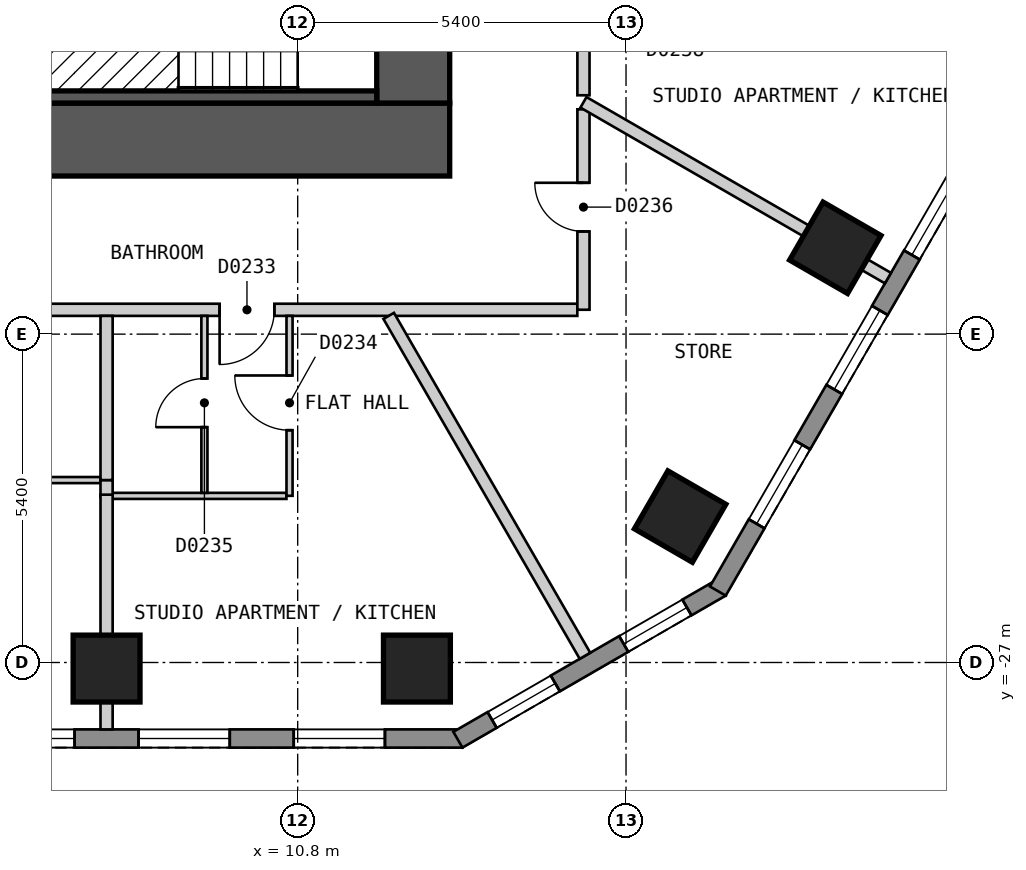
"""IFC4 building model, lengths in metres.
Left out: names, types, materials, properties, quantities, classifications, styles, units other than length and angle.
Written with IfcOpenShell. Run it as: python <this file> out.ifc"""

import sys

from ifc_helpers import new_model, si_unit, direction, frame, frame_2d, origin, origin_2d, place, context, subcontext, project, spatial, polyline, rectangle, outline, extrude, element, fill, save


model = new_model("IFC4")
c1 = context("Model", 3, precision=1e-05, world=origin(), true_north=direction((0.0, 1.0)))
c2 = subcontext(c1, "Body", "Model", "MODEL_VIEW")
j1 = project(units=[si_unit("LENGTHUNIT", "METRE"), si_unit("PLANEANGLEUNIT", "RADIAN")], contexts=[c1])
p1 = place(None, origin())
s1 = spatial("IfcSite", under=j1, at=p1, CompositionType="ELEMENT")
p2 = place(p1, origin())
s2 = spatial("IfcBuilding", under=s1, at=p2, CompositionType="ELEMENT")
p3 = place(p2, frame((0.0, 0.0, 41.4)))
s3 = spatial("IfcBuildingStorey", under=s2, at=p3, CompositionType="ELEMENT", Elevation=41.4)
for number, where, z_axis, x_axis in (
    (1, (7.657, -27.1, 0.0), (0.0, 0.0, 1.0), (1.0, 0.0, 0.0)),
    (2, (12.761, -27.1, 0.0), (0.0, 0.0, 1.0), (1.0, 0.0, 0.0)),
    (3, (17.09, -24.6, 0.0), (0.0, 0.0, 1.0), (0.5, 0.866, 0.0)),
    (4, (19.642, -20.18, 0.0), (0.0, 0.0, 1.0), (0.5, 0.866, 0.0)),
):
    element("IfcColumn", number, at=place(p3, frame(where, z_axis=z_axis, x_axis=x_axis)), inside=s3, PredefinedType="COLUMN", context=c2, shape_type="SweptSolid", body=[
        extrude(rectangle(XDim=1.1, YDim=1.1, at=origin_2d()), origin(), (0.0, 0.0, 1.0), 3.0),
    ])
p4 = place(p3, frame((-13.3, -18.4, 0.0), z_axis=(0.0, 0.0, 1.0), x_axis=(1.0, 0.0, 0.0)))
e5 = element("IfcWall", 5, at=p4, inside=s3, PredefinedType="SHEAR", context=c2, shape_type="SweptSolid", body=[
    extrude(rectangle(XDim=26.6, YDim=1.2, at=frame_2d((13.3, 0.0))), origin(), (0.0, 0.0, 1.0), 2.7),
])
p5 = place(p3, frame((12.7, -17.8, 0.0), z_axis=(0.0, 0.0, 1.0), x_axis=(0.0, 1.0, 0.0)))
e6 = element("IfcWall", 6, at=p5, inside=s3, PredefinedType="SHEAR", context=c2, shape_type="SweptSolid", body=[
    extrude(rectangle(XDim=11.6, YDim=1.2, at=frame_2d((5.8, 0.0))), origin(), (0.0, 0.0, 1.0), 2.7),
])
p6 = place(p3, frame((-13.51, -28.25, 0.0), z_axis=(0.0, 0.0, 1.0), x_axis=(1.0, 0.0, 0.0)))
e7 = element("IfcWall", 7, at=p6, inside=s3, PredefinedType="SOLIDWALL", context=c2, shape_type="SweptSolid", body=[
    extrude(outline(polyline([(0.0, -0.15), (27.02, -0.15), (26.94, 0.15), (0.08, 0.15), (0.0, -0.15)])), origin(), (0.0, 0.0, 1.0), 2.7),
])
p7 = place(p6, frame((1.277, 0.0, 0.15)))
e8 = element("IfcOpeningElement", 8, at=p7, cuts=e7, PredefinedType="OPENING", context=c2, shape_type="SweptSolid", body=[
    extrude(rectangle(XDim=1.5, YDim=2.1, at=frame_2d((0.75, 1.05))), frame((0.0, 0.16, 0.0), z_axis=(0.0, -1.0, 0.0), x_axis=(1.0, 0.0, 0.0)), (0.0, 0.0, 1.0), 0.32),
])
p8 = place(p6, frame((3.829, 0.0, 0.15)))
e9 = element("IfcOpeningElement", 9, at=p8, cuts=e7, PredefinedType="OPENING", context=c2, shape_type="SweptSolid", body=[
    extrude(rectangle(XDim=1.5, YDim=2.1, at=frame_2d((0.75, 1.05))), frame((0.0, 0.16, 0.0), z_axis=(0.0, -1.0, 0.0), x_axis=(1.0, 0.0, 0.0)), (0.0, 0.0, 1.0), 0.32),
])
p9 = place(p6, frame((6.381, 0.0, 0.15)))
e10 = element("IfcOpeningElement", 10, at=p9, cuts=e7, PredefinedType="OPENING", context=c2, shape_type="SweptSolid", body=[
    extrude(rectangle(XDim=1.5, YDim=2.1, at=frame_2d((0.75, 1.05))), frame((0.0, 0.16, 0.0), z_axis=(0.0, -1.0, 0.0), x_axis=(1.0, 0.0, 0.0)), (0.0, 0.0, 1.0), 0.32),
])
p10 = place(p6, frame((8.933, 0.0, 0.15)))
e11 = element("IfcOpeningElement", 11, at=p10, cuts=e7, PredefinedType="OPENING", context=c2, shape_type="SweptSolid", body=[
    extrude(rectangle(XDim=1.5, YDim=2.1, at=frame_2d((0.75, 1.05))), frame((0.0, 0.16, 0.0), z_axis=(0.0, -1.0, 0.0), x_axis=(1.0, 0.0, 0.0)), (0.0, 0.0, 1.0), 0.32),
])
p11 = place(p6, frame((11.485, 0.0, 0.15)))
e12 = element("IfcOpeningElement", 12, at=p11, cuts=e7, PredefinedType="OPENING", context=c2, shape_type="SweptSolid", body=[
    extrude(rectangle(XDim=1.5, YDim=2.1, at=frame_2d((0.75, 1.05))), frame((0.0, 0.16, 0.0), z_axis=(0.0, -1.0, 0.0), x_axis=(1.0, 0.0, 0.0)), (0.0, 0.0, 1.0), 0.32),
])
p12 = place(p6, frame((14.037, 0.0, 0.15)))
e13 = element("IfcOpeningElement", 13, at=p12, cuts=e7, PredefinedType="OPENING", context=c2, shape_type="SweptSolid", body=[
    extrude(rectangle(XDim=1.5, YDim=2.1, at=frame_2d((0.75, 1.05))), frame((0.0, 0.16, 0.0), z_axis=(0.0, -1.0, 0.0), x_axis=(1.0, 0.0, 0.0)), (0.0, 0.0, 1.0), 0.32),
])
p13 = place(p6, frame((16.589, 0.0, 0.15)))
e14 = element("IfcOpeningElement", 14, at=p13, cuts=e7, PredefinedType="OPENING", context=c2, shape_type="SweptSolid", body=[
    extrude(rectangle(XDim=1.5, YDim=2.1, at=frame_2d((0.75, 1.05))), frame((0.0, 0.16, 0.0), z_axis=(0.0, -1.0, 0.0), x_axis=(1.0, 0.0, 0.0)), (0.0, 0.0, 1.0), 0.32),
])
p14 = place(p6, frame((19.141, 0.0, 0.15)))
e15 = element("IfcOpeningElement", 15, at=p14, cuts=e7, PredefinedType="OPENING", context=c2, shape_type="SweptSolid", body=[
    extrude(rectangle(XDim=1.5, YDim=2.1, at=frame_2d((0.75, 1.05))), frame((0.0, 0.16, 0.0), z_axis=(0.0, -1.0, 0.0), x_axis=(1.0, 0.0, 0.0)), (0.0, 0.0, 1.0), 0.32),
])
p15 = place(p6, frame((21.693, 0.0, 0.15)))
e16 = element("IfcOpeningElement", 16, at=p15, cuts=e7, PredefinedType="OPENING", context=c2, shape_type="SweptSolid", body=[
    extrude(rectangle(XDim=1.5, YDim=2.1, at=frame_2d((0.75, 1.05))), frame((0.0, 0.16, 0.0), z_axis=(0.0, -1.0, 0.0), x_axis=(1.0, 0.0, 0.0)), (0.0, 0.0, 1.0), 0.32),
])
p16 = place(p6, frame((24.245, 0.0, 0.15)))
e17 = element("IfcOpeningElement", 17, at=p16, cuts=e7, PredefinedType="OPENING", context=c2, shape_type="SweptSolid", body=[
    extrude(rectangle(XDim=1.5, YDim=2.1, at=frame_2d((0.75, 1.05))), frame((0.0, 0.16, 0.0), z_axis=(0.0, -1.0, 0.0), x_axis=(1.0, 0.0, 0.0)), (0.0, 0.0, 1.0), 0.32),
])
p17 = place(p3, frame((13.435, -28.27, 0.0), z_axis=(0.0, 0.0, 1.0), x_axis=(0.866010750942, 0.50002537861, 0.0)))
e18 = element("IfcWall", 18, at=p17, inside=s3, PredefinedType="SOLIDWALL", context=c2, shape_type="SweptSolid", body=[
    extrude(outline(polyline([(0.0, -0.15), (5.0, -0.15), (4.919, 0.15), (0.08, 0.15), (0.0, -0.15)])), origin(), (0.0, 0.0, 1.0), 2.7),
])
p18 = place(p17, frame((0.65, 0.0, 0.15)))
e19 = element("IfcOpeningElement", 19, at=p18, cuts=e18, PredefinedType="OPENING", context=c2, shape_type="SweptSolid", body=[
    extrude(rectangle(XDim=1.2, YDim=2.1, at=frame_2d((0.6, 1.05))), frame((0.0, 0.16, 0.0), z_axis=(0.0, -1.0, 0.0), x_axis=(1.0, 0.0, 0.0)), (0.0, 0.0, 1.0), 0.32),
])
p19 = place(p17, frame((3.149, 0.0, 0.15)))
e20 = element("IfcOpeningElement", 20, at=p19, cuts=e18, PredefinedType="OPENING", context=c2, shape_type="SweptSolid", body=[
    extrude(rectangle(XDim=1.2, YDim=2.1, at=frame_2d((0.6, 1.05))), frame((0.0, 0.16, 0.0), z_axis=(0.0, -1.0, 0.0), x_axis=(1.0, 0.0, 0.0)), (0.0, 0.0, 1.0), 0.32),
])
p20 = place(p3, frame((17.71, -25.825, 0.0), z_axis=(0.0, 0.0, 1.0), x_axis=(0.500001938803, 0.866024284413, 0.0)))
e21 = element("IfcWall", 21, at=p20, inside=s3, PredefinedType="SOLIDWALL", context=c2, shape_type="SweptSolid", body=[
    extrude(outline(polyline([(0.0, -0.15), (27.02, -0.15), (26.94, 0.15), (0.08, 0.15), (0.0, -0.15)])), origin(), (0.0, 0.0, 1.0), 2.7),
])
p21 = place(p20, frame((1.277, 0.0, 0.15)))
e22 = element("IfcOpeningElement", 22, at=p21, cuts=e21, PredefinedType="OPENING", context=c2, shape_type="SweptSolid", body=[
    extrude(rectangle(XDim=1.5, YDim=2.1, at=frame_2d((0.75, 1.05))), frame((0.0, 0.16, 0.0), z_axis=(0.0, -1.0, 0.0), x_axis=(1.0, 0.0, 0.0)), (0.0, 0.0, 1.0), 0.32),
])
p22 = place(p20, frame((3.829, 0.0, 0.15)))
e23 = element("IfcOpeningElement", 23, at=p22, cuts=e21, PredefinedType="OPENING", context=c2, shape_type="SweptSolid", body=[
    extrude(rectangle(XDim=1.5, YDim=2.1, at=frame_2d((0.75, 1.05))), frame((0.0, 0.16, 0.0), z_axis=(0.0, -1.0, 0.0), x_axis=(1.0, 0.0, 0.0)), (0.0, 0.0, 1.0), 0.32),
])
p23 = place(p20, frame((6.382, 0.0, 0.15)))
e24 = element("IfcOpeningElement", 24, at=p23, cuts=e21, PredefinedType="OPENING", context=c2, shape_type="SweptSolid", body=[
    extrude(rectangle(XDim=1.5, YDim=2.1, at=frame_2d((0.75, 1.05))), frame((0.0, 0.16, 0.0), z_axis=(0.0, -1.0, 0.0), x_axis=(1.0, 0.0, 0.0)), (0.0, 0.0, 1.0), 0.32),
])
p24 = place(p20, frame((8.933, 0.0, 0.15)))
e25 = element("IfcOpeningElement", 25, at=p24, cuts=e21, PredefinedType="OPENING", context=c2, shape_type="SweptSolid", body=[
    extrude(rectangle(XDim=1.5, YDim=2.1, at=frame_2d((0.75, 1.05))), frame((0.0, 0.16, 0.0), z_axis=(0.0, -1.0, 0.0), x_axis=(1.0, 0.0, 0.0)), (0.0, 0.0, 1.0), 0.32),
])
p25 = place(p20, frame((11.485, 0.0, 0.15)))
e26 = element("IfcOpeningElement", 26, at=p25, cuts=e21, PredefinedType="OPENING", context=c2, shape_type="SweptSolid", body=[
    extrude(rectangle(XDim=1.5, YDim=2.1, at=frame_2d((0.75, 1.05))), frame((0.0, 0.16, 0.0), z_axis=(0.0, -1.0, 0.0), x_axis=(1.0, 0.0, 0.0)), (0.0, 0.0, 1.0), 0.32),
])
p26 = place(p20, frame((14.037, 0.0, 0.15)))
e27 = element("IfcOpeningElement", 27, at=p26, cuts=e21, PredefinedType="OPENING", context=c2, shape_type="SweptSolid", body=[
    extrude(rectangle(XDim=1.5, YDim=2.1, at=frame_2d((0.75, 1.05))), frame((0.0, 0.16, 0.0), z_axis=(0.0, -1.0, 0.0), x_axis=(1.0, 0.0, 0.0)), (0.0, 0.0, 1.0), 0.32),
])
p27 = place(p20, frame((16.589, 0.0, 0.15)))
e28 = element("IfcOpeningElement", 28, at=p27, cuts=e21, PredefinedType="OPENING", context=c2, shape_type="SweptSolid", body=[
    extrude(rectangle(XDim=1.5, YDim=2.1, at=frame_2d((0.75, 1.05))), frame((0.0, 0.16, 0.0), z_axis=(0.0, -1.0, 0.0), x_axis=(1.0, 0.0, 0.0)), (0.0, 0.0, 1.0), 0.32),
])
p28 = place(p20, frame((19.141, 0.0, 0.15)))
e29 = element("IfcOpeningElement", 29, at=p28, cuts=e21, PredefinedType="OPENING", context=c2, shape_type="SweptSolid", body=[
    extrude(rectangle(XDim=1.5, YDim=2.1, at=frame_2d((0.75, 1.05))), frame((0.0, 0.16, 0.0), z_axis=(0.0, -1.0, 0.0), x_axis=(1.0, 0.0, 0.0)), (0.0, 0.0, 1.0), 0.32),
])
p29 = place(p20, frame((21.693, 0.0, 0.15)))
e30 = element("IfcOpeningElement", 30, at=p29, cuts=e21, PredefinedType="OPENING", context=c2, shape_type="SweptSolid", body=[
    extrude(rectangle(XDim=1.5, YDim=2.1, at=frame_2d((0.75, 1.05))), frame((0.0, 0.16, 0.0), z_axis=(0.0, -1.0, 0.0), x_axis=(1.0, 0.0, 0.0)), (0.0, 0.0, 1.0), 0.32),
])
p30 = place(p20, frame((24.244, 0.0, 0.15)))
e31 = element("IfcOpeningElement", 31, at=p30, cuts=e21, PredefinedType="OPENING", context=c2, shape_type="SweptSolid", body=[
    extrude(rectangle(XDim=1.5, YDim=2.1, at=frame_2d((0.75, 1.05))), frame((0.0, 0.16, 0.0), z_axis=(0.0, -1.0, 0.0), x_axis=(1.0, 0.0, 0.0)), (0.0, 0.0, 1.0), 0.32),
])
p31 = place(p3, frame((15.5, -15.943, 0.0), z_axis=(0.0, 0.0, 1.0), x_axis=(0.0, -1.0, 0.0)))
e32 = element("IfcWall", 32, at=p31, inside=s3, PredefinedType="PARTITIONING", context=c2, shape_type="SweptSolid", body=[
    extrude(rectangle(XDim=1.729, YDim=0.2, at=frame_2d((0.865, 0.0))), origin(), (0.0, 0.0, 1.0), 2.7),
])
p32 = place(p3, frame((-15.499, -21.2, 0.0), z_axis=(0.0, 0.0, 1.0), x_axis=(1.0, 0.0, 0.0)))
e33 = element("IfcWall", 33, at=p32, inside=s3, PredefinedType="PARTITIONING", context=c2, shape_type="SweptSolid", body=[
    extrude(rectangle(XDim=30.898, YDim=0.2, at=frame_2d((15.449, 0.0))), origin(), (0.0, 0.0, 1.0), 2.7),
])
p33 = place(p32, frame((5.084, 0.0, 0.0)))
e34 = element("IfcOpeningElement", 34, at=p33, cuts=e33, PredefinedType="OPENING", context=c2, shape_type="SweptSolid", body=[
    extrude(rectangle(XDim=0.9, YDim=2.1, at=frame_2d((0.45, 1.05))), frame((0.0, 0.11, 0.0), z_axis=(0.0, -1.0, 0.0), x_axis=(1.0, 0.0, 0.0)), (0.0, 0.0, 1.0), 0.22),
])
p34 = place(p32, frame((15.0, 0.0, 0.0)))
e35 = element("IfcOpeningElement", 35, at=p34, cuts=e33, PredefinedType="OPENING", context=c2, shape_type="SweptSolid", body=[
    extrude(rectangle(XDim=1.0, YDim=2.1, at=frame_2d((0.5, 1.05))), frame((0.0, 0.11, 0.0), z_axis=(0.0, -1.0, 0.0), x_axis=(1.0, 0.0, 0.0)), (0.0, 0.0, 1.0), 0.22),
])
p35 = place(p32, frame((25.015, 0.0, 0.0)))
e36 = element("IfcOpeningElement", 36, at=p35, cuts=e33, PredefinedType="OPENING", context=c2, shape_type="SweptSolid", body=[
    extrude(rectangle(XDim=0.9, YDim=2.1, at=frame_2d((0.45, 1.05))), frame((0.0, 0.11, 0.0), z_axis=(0.0, -1.0, 0.0), x_axis=(1.0, 0.0, 0.0)), (0.0, 0.0, 1.0), 0.22),
])
p36 = place(p3, frame((15.5, -21.199, 0.0), z_axis=(0.0, 0.0, 1.0), x_axis=(0.0, 1.0, 0.0)))
e37 = element("IfcWall", 37, at=p36, inside=s3, PredefinedType="PARTITIONING", context=c2, shape_type="SweptSolid", body=[
    extrude(rectangle(XDim=3.296, YDim=0.2, at=frame_2d((1.648, 0.0))), origin(), (0.0, 0.0, 1.0), 2.7),
])
p37 = place(p36, frame((1.288, 0.0, 0.0)))
e38 = element("IfcOpeningElement", 38, at=p37, cuts=e37, PredefinedType="OPENING", context=c2, shape_type="SweptSolid", body=[
    extrude(rectangle(XDim=0.8, YDim=2.1, at=frame_2d((0.4, 1.05))), frame((0.0, 0.11, 0.0), z_axis=(0.0, -1.0, 0.0), x_axis=(1.0, 0.0, 0.0)), (0.0, 0.0, 1.0), 0.22),
])
p38 = place(p3, frame((2.603, -24.0, 0.0), z_axis=(0.0, 0.0, 1.0), x_axis=(1.0, 0.0, 0.0)))
e39 = element("IfcWall", 39, at=p38, inside=s3, PredefinedType="PARTITIONING", context=c2, shape_type="SweptSolid", body=[
    extrude(rectangle(XDim=4.954, YDim=0.1, at=frame_2d((2.477, 0.0))), origin(), (0.0, 0.0, 1.0), 2.7),
])
p39 = place(p38, frame((2.102, 0.0, 0.0)))
e40 = element("IfcOpeningElement", 40, at=p39, cuts=e39, PredefinedType="OPENING", context=c2, shape_type="SweptSolid", body=[
    extrude(rectangle(XDim=0.8, YDim=2.1, at=frame_2d((0.4, 1.05))), frame((0.0, 0.06, 0.0), z_axis=(0.0, -1.0, 0.0), x_axis=(1.0, 0.0, 0.0)), (0.0, 0.0, 1.0), 0.12),
])
p40 = place(p3, frame((7.757, -24.26, 0.0), z_axis=(0.0, 0.0, 1.0), x_axis=(1.0, 0.0, 0.0)))
e41 = element("IfcWall", 41, at=p40, inside=s3, PredefinedType="PARTITIONING", context=c2, shape_type="SweptSolid", body=[
    extrude(rectangle(XDim=2.858, YDim=0.1, at=frame_2d((1.429, 0.0))), origin(), (0.0, 0.0, 1.0), 2.7),
])
p41 = place(p3, frame((9.266, -24.21, 0.0), z_axis=(0.0, 0.0, 1.0), x_axis=(0.0, 1.0, 0.0)))
e42 = element("IfcWall", 42, at=p41, inside=s3, PredefinedType="PARTITIONING", context=c2, shape_type="SweptSolid", body=[
    extrude(rectangle(XDim=2.91, YDim=0.1, at=frame_2d((1.455, 0.0))), origin(), (0.0, 0.0, 1.0), 2.7),
])
p42 = place(p41, frame((1.08, 0.0, 0.0)))
e43 = element("IfcOpeningElement", 43, at=p42, cuts=e42, PredefinedType="OPENING", context=c2, shape_type="SweptSolid", body=[
    extrude(rectangle(XDim=0.8, YDim=2.1, at=frame_2d((0.4, 1.05))), frame((0.0, 0.06, 0.0), z_axis=(0.0, -1.0, 0.0), x_axis=(1.0, 0.0, 0.0)), (0.0, 0.0, 1.0), 0.12),
])
p43 = place(p3, frame((10.666, -24.259, 0.0), z_axis=(0.0, 0.0, 1.0), x_axis=(0.0, 1.0, 0.0)))
e44 = element("IfcWall", 44, at=p43, inside=s3, PredefinedType="PARTITIONING", context=c2, shape_type="SweptSolid", body=[
    extrude(rectangle(XDim=2.959, YDim=0.1, at=frame_2d((1.479, 0.0))), origin(), (0.0, 0.0, 1.0), 2.7),
])
p44 = place(p43, frame((1.079, 0.0, 0.0)))
e45 = element("IfcOpeningElement", 45, at=p44, cuts=e44, PredefinedType="OPENING", context=c2, shape_type="SweptSolid", body=[
    extrude(rectangle(XDim=0.9, YDim=2.1, at=frame_2d((0.45, 1.05))), frame((0.0, 0.06, 0.0), z_axis=(0.0, -1.0, 0.0), x_axis=(1.0, 0.0, 0.0)), (0.0, 0.0, 1.0), 0.12),
])
p45 = place(p3, frame((12.297, -21.3, 0.0), z_axis=(0.0, 0.0, 1.0), x_axis=(0.500056399578, -0.865992839024, 0.0)))
e46 = element("IfcWall", 46, at=p45, inside=s3, PredefinedType="PARTITIONING", context=c2, shape_type="SweptSolid", body=[
    extrude(rectangle(XDim=6.455, YDim=0.2, at=frame_2d((3.228, 0.0))), origin(), (0.0, 0.0, 1.0), 2.7),
])
p46 = place(p3, frame((7.657, -24.0, 0.0), z_axis=(0.0, 0.0, 1.0), x_axis=(0.0, -1.0, 0.0)))
e47 = element("IfcWall", 47, at=p46, inside=s3, PredefinedType="PARTITIONING", context=c2, shape_type="SweptSolid", body=[
    extrude(rectangle(XDim=0.28, YDim=0.2, at=frame_2d((0.14, 0.0))), origin(), (0.0, 0.0, 1.0), 2.7),
])
p47 = place(p3, frame((15.5, -17.788, 0.0), z_axis=(0.0, 0.0, 1.0), x_axis=(0.866065366639, -0.499930775916, 0.0)))
e48 = element("IfcWall", 48, at=p47, inside=s3, PredefinedType="PARTITIONING", context=c2, shape_type="SweptSolid", body=[
    extrude(rectangle(XDim=5.782, YDim=0.2, at=frame_2d((2.891, 0.0))), origin(), (0.0, 0.0, 1.0), 2.7),
])
p48 = place(p3, frame((7.657, -28.1, 0.0), z_axis=(0.0, 0.0, 1.0), x_axis=(0.0, 1.0, 0.0)))
e49 = element("IfcWall", 49, at=p48, inside=s3, PredefinedType="PARTITIONING", context=c2, shape_type="SweptSolid", body=[
    extrude(rectangle(XDim=3.86, YDim=0.2, at=frame_2d((1.93, 0.0))), origin(), (0.0, 0.0, 1.0), 2.7),
])
p49 = place(p3, frame((7.657, -24.0, 0.0), z_axis=(0.0, 0.0, 1.0), x_axis=(0.0, 1.0, 0.0)))
e50 = element("IfcWall", 50, at=p49, inside=s3, PredefinedType="PARTITIONING", context=c2, shape_type="SweptSolid", body=[
    extrude(rectangle(XDim=2.7, YDim=0.2, at=frame_2d((1.35, 0.0))), origin(), (0.0, 0.0, 1.0), 2.7),
])
p50 = place(p3, frame((6.7, -17.7, 0.0), z_axis=(0.0, 0.0, 1.0), x_axis=(1.0, 0.0, 0.0)))
e51 = element("IfcWall", 51, at=p50, inside=s3, PredefinedType="SOLIDWALL", context=c2, shape_type="SweptSolid", body=[
    extrude(rectangle(XDim=5.4, YDim=0.2, at=frame_2d((2.7, 0.0))), origin(), (0.0, 0.0, 1.0), 2.7),
])
p51 = place(p14, origin())
e52 = element("IfcWindow", 52, at=p51, inside=s3, PartitioningType="SINGLE_PANEL", PredefinedType="WINDOW", context=c2, shape_type="SweptSolid", body=[
    extrude(rectangle(XDim=1.5, YDim=2.1, at=frame_2d((0.75, 1.05))), frame((0.0, 0.03, 0.0), z_axis=(0.0, -1.0, 0.0), x_axis=(1.0, 0.0, 0.0)), (0.0, 0.0, 1.0), 0.06),
])
fill(e15, e52)
p52 = place(p15, origin())
e53 = element("IfcWindow", 53, at=p52, inside=s3, PartitioningType="SINGLE_PANEL", PredefinedType="WINDOW", context=c2, shape_type="SweptSolid", body=[
    extrude(rectangle(XDim=1.5, YDim=2.1, at=frame_2d((0.75, 1.05))), frame((0.0, 0.03, 0.0), z_axis=(0.0, -1.0, 0.0), x_axis=(1.0, 0.0, 0.0)), (0.0, 0.0, 1.0), 0.06),
])
fill(e16, e53)
p53 = place(p16, origin())
e54 = element("IfcWindow", 54, at=p53, inside=s3, PartitioningType="SINGLE_PANEL", PredefinedType="WINDOW", context=c2, shape_type="SweptSolid", body=[
    extrude(rectangle(XDim=1.5, YDim=2.1, at=frame_2d((0.75, 1.05))), frame((0.0, 0.03, 0.0), z_axis=(0.0, -1.0, 0.0), x_axis=(1.0, 0.0, 0.0)), (0.0, 0.0, 1.0), 0.06),
])
fill(e17, e54)
p54 = place(p18, origin())
e55 = element("IfcWindow", 55, at=p54, inside=s3, PartitioningType="SINGLE_PANEL", PredefinedType="WINDOW", context=c2, shape_type="SweptSolid", body=[
    extrude(rectangle(XDim=1.2, YDim=2.1, at=frame_2d((0.6, 1.05))), frame((0.0, 0.03, 0.0), z_axis=(0.0, -1.0, 0.0), x_axis=(1.0, 0.0, 0.0)), (0.0, 0.0, 1.0), 0.06),
])
fill(e19, e55)
p55 = place(p19, origin())
e56 = element("IfcWindow", 56, at=p55, inside=s3, PartitioningType="SINGLE_PANEL", PredefinedType="WINDOW", context=c2, shape_type="SweptSolid", body=[
    extrude(rectangle(XDim=1.2, YDim=2.1, at=frame_2d((0.6, 1.05))), frame((0.0, 0.03, 0.0), z_axis=(0.0, -1.0, 0.0), x_axis=(1.0, 0.0, 0.0)), (0.0, 0.0, 1.0), 0.06),
])
fill(e20, e56)
p56 = place(p21, origin())
e57 = element("IfcWindow", 57, at=p56, inside=s3, PartitioningType="SINGLE_PANEL", PredefinedType="WINDOW", context=c2, shape_type="SweptSolid", body=[
    extrude(rectangle(XDim=1.5, YDim=2.1, at=frame_2d((0.75, 1.05))), frame((0.0, 0.03, 0.0), z_axis=(0.0, -1.0, 0.0), x_axis=(1.0, 0.0, 0.0)), (0.0, 0.0, 1.0), 0.06),
])
fill(e22, e57)
p57 = place(p22, origin())
e58 = element("IfcWindow", 58, at=p57, inside=s3, PartitioningType="SINGLE_PANEL", PredefinedType="WINDOW", context=c2, shape_type="SweptSolid", body=[
    extrude(rectangle(XDim=1.5, YDim=2.1, at=frame_2d((0.75, 1.05))), frame((0.0, 0.03, 0.0), z_axis=(0.0, -1.0, 0.0), x_axis=(1.0, 0.0, 0.0)), (0.0, 0.0, 1.0), 0.06),
])
fill(e23, e58)
p58 = place(p23, origin())
e59 = element("IfcWindow", 59, at=p58, inside=s3, PartitioningType="SINGLE_PANEL", PredefinedType="WINDOW", context=c2, shape_type="SweptSolid", body=[
    extrude(rectangle(XDim=1.5, YDim=2.1, at=frame_2d((0.75, 1.05))), frame((0.0, 0.03, 0.0), z_axis=(0.0, -1.0, 0.0), x_axis=(1.0, 0.0, 0.0)), (0.0, 0.0, 1.0), 0.06),
])
fill(e24, e59)
p59 = place(p35, origin())
e60 = element("IfcDoor", 60, at=p59, inside=s3, OperationType="SINGLE_SWING_LEFT", PredefinedType="DOOR", context=c2, shape_type="SweptSolid", body=[
    extrude(rectangle(XDim=0.9, YDim=2.1, at=frame_2d((0.45, 1.05))), frame((0.0, 0.025, 0.0), z_axis=(0.0, -1.0, 0.0), x_axis=(1.0, 0.0, 0.0)), (0.0, 0.0, 1.0), 0.05),
])
fill(e36, e60)
p60 = place(p44, origin())
e61 = element("IfcDoor", 61, at=p60, inside=s3, OperationType="SINGLE_SWING_RIGHT", PredefinedType="DOOR", context=c2, shape_type="SweptSolid", body=[
    extrude(rectangle(XDim=0.9, YDim=2.1, at=frame_2d((0.45, 1.05))), frame((0.0, 0.025, 0.0), z_axis=(0.0, -1.0, 0.0), x_axis=(1.0, 0.0, 0.0)), (0.0, 0.0, 1.0), 0.05),
])
fill(e45, e61)
p61 = place(p42, origin())
e62 = element("IfcDoor", 62, at=p61, inside=s3, OperationType="SINGLE_SWING_LEFT", PredefinedType="DOOR", context=c2, shape_type="SweptSolid", body=[
    extrude(rectangle(XDim=0.8, YDim=2.1, at=frame_2d((0.4, 1.05))), frame((0.0, 0.025, 0.0), z_axis=(0.0, -1.0, 0.0), x_axis=(1.0, 0.0, 0.0)), (0.0, 0.0, 1.0), 0.05),
])
fill(e43, e62)
p62 = place(p37, origin())
e63 = element("IfcDoor", 63, at=p62, inside=s3, OperationType="SINGLE_SWING_RIGHT", PredefinedType="DOOR", context=c2, shape_type="SweptSolid", body=[
    extrude(rectangle(XDim=0.8, YDim=2.1, at=frame_2d((0.4, 1.05))), frame((0.0, 0.025, 0.0), z_axis=(0.0, -1.0, 0.0), x_axis=(1.0, 0.0, 0.0)), (0.0, 0.0, 1.0), 0.05),
])
fill(e38, e63)
save(model, sys.argv[1])
